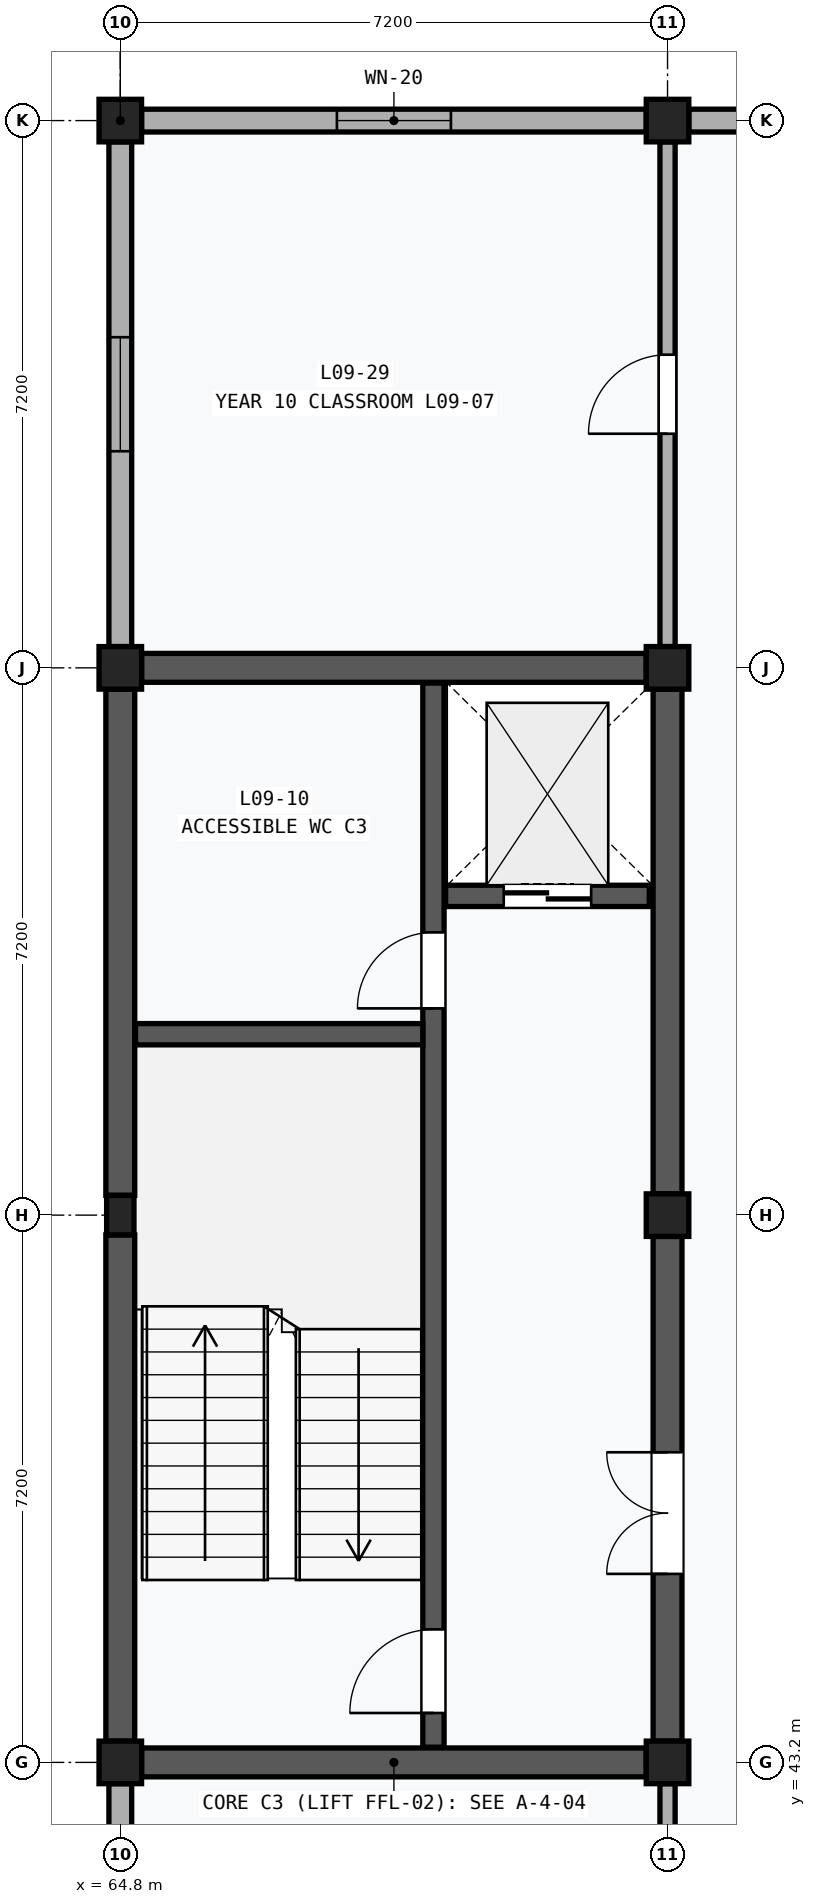
"""IFC4 building model, lengths in metres.
Left out: names, types, materials, properties, quantities, classifications, styles, units other than length and angle.
Written with IfcOpenShell. Run it as: python <this file> out.ifc"""

import sys

from ifc_helpers import new_model, si_unit, direction, frame, frame_2d, origin, origin_2d, place, context, subcontext, project, spatial, rectangle, extrude, element, fill, save


model = new_model("IFC4")
c1 = context("Model", 3, precision=1e-05, world=origin(), true_north=direction((0.0, 1.0)))
c2 = subcontext(c1, "Body", "Model", "MODEL_VIEW")
j1 = project(units=[si_unit("LENGTHUNIT", "METRE"), si_unit("PLANEANGLEUNIT", "RADIAN")], contexts=[c1])
p1 = place(None, origin())
s1 = spatial("IfcSite", under=j1, at=p1, CompositionType="ELEMENT")
p2 = place(p1, origin())
s2 = spatial("IfcBuilding", under=s1, at=p2, CompositionType="ELEMENT")
p3 = place(p2, frame((0.0, 0.0, 38.8)))
s3 = spatial("IfcBuildingStorey", under=s2, at=p3, CompositionType="ELEMENT", Elevation=38.8)
p4 = place(p3, frame((64.8, 43.2, 0.0), z_axis=(0.0, 0.0, 1.0), x_axis=(1.0, 0.0, 0.0)))
e1 = element("IfcColumn", 1, at=p4, inside=s3, PredefinedType="COLUMN", context=c2, shape_type="SweptSolid", body=[
    extrude(rectangle(XDim=0.56, YDim=0.56, at=origin_2d()), origin(), (0.0, 0.0, 1.0), 4.0),
])
p5 = place(p3, frame((64.8, 50.4, 0.0), z_axis=(0.0, 0.0, 1.0), x_axis=(1.0, 0.0, 0.0)))
e2 = element("IfcColumn", 2, at=p5, inside=s3, PredefinedType="PILASTER", context=c2, shape_type="SweptSolid", body=[
    extrude(rectangle(XDim=0.36, YDim=0.52, at=origin_2d()), origin(), (0.0, 0.0, 1.0), 4.0),
])
for number, where, z_axis, x_axis in (
    (3, (64.8, 57.6, 0.0), (0.0, 0.0, 1.0), (1.0, 0.0, 0.0)),
    (4, (64.8, 64.8, 0.0), (0.0, 0.0, 1.0), (1.0, 0.0, 0.0)),
    (5, (72.0, 43.2, 0.0), (0.0, 0.0, 1.0), (1.0, 0.0, 0.0)),
    (6, (72.0, 50.4, 0.0), (0.0, 0.0, 1.0), (1.0, 0.0, 0.0)),
    (7, (72.0, 57.6, 0.0), (0.0, 0.0, 1.0), (1.0, 0.0, 0.0)),
    (8, (72.0, 64.8, 0.0), (0.0, 0.0, 1.0), (1.0, 0.0, 0.0)),
):
    element("IfcColumn", number, at=place(p3, frame(where, z_axis=z_axis, x_axis=x_axis)), inside=s3, PredefinedType="COLUMN", context=c2, shape_type="SweptSolid", body=[
        extrude(rectangle(XDim=0.56, YDim=0.56, at=origin_2d()), origin(), (0.0, 0.0, 1.0), 4.0),
    ])
p6 = place(p3, frame((64.8, 36.28, 0.0), z_axis=(0.0, 0.0, 1.0), x_axis=(0.0, 1.0, 0.0)))
e9 = element("IfcWall", 9, at=p6, inside=s3, PredefinedType="SOLIDWALL", context=c2, shape_type="SweptSolid", body=[
    extrude(rectangle(XDim=6.64, YDim=0.3, at=frame_2d((3.32, 0.0))), origin(), (0.0, 0.0, 1.0), 3.17),
])
p7 = place(p3, frame((65.08, 64.8, 0.0), z_axis=(0.0, 0.0, 1.0), x_axis=(1.0, 0.0, 0.0)))
e10 = element("IfcWall", 10, at=p7, inside=s3, PredefinedType="SOLIDWALL", context=c2, shape_type="SweptSolid", body=[
    extrude(rectangle(XDim=6.64, YDim=0.3, at=frame_2d((3.32, 0.0))), origin(), (0.0, 0.0, 1.0), 3.17),
])
p8 = place(p7, frame((2.57, 0.0, 1.1)))
e11 = element("IfcOpeningElement", 11, at=p8, cuts=e10, PredefinedType="OPENING", context=c2, shape_type="SweptSolid", body=[
    extrude(rectangle(XDim=1.5, YDim=1.35, at=frame_2d((0.75, 0.675))), frame((0.0, 0.162, 0.0), z_axis=(0.0, -1.0, 0.0), x_axis=(1.0, 0.0, 0.0)), (0.0, 0.0, 1.0), 0.324),
])
p9 = place(p3, frame((64.8, 57.88, 0.0), z_axis=(0.0, 0.0, 1.0), x_axis=(0.0, 1.0, 0.0)))
e12 = element("IfcWall", 12, at=p9, inside=s3, PredefinedType="SOLIDWALL", context=c2, shape_type="SweptSolid", body=[
    extrude(rectangle(XDim=6.64, YDim=0.3, at=frame_2d((3.32, 0.0))), origin(), (0.0, 0.0, 1.0), 3.17),
])
p10 = place(p9, frame((2.57, 0.0, 1.1)))
e13 = element("IfcOpeningElement", 13, at=p10, cuts=e12, PredefinedType="OPENING", context=c2, shape_type="SweptSolid", body=[
    extrude(rectangle(XDim=1.5, YDim=1.35, at=frame_2d((0.75, 0.675))), frame((0.0, 0.162, 0.0), z_axis=(0.0, -1.0, 0.0), x_axis=(1.0, 0.0, 0.0)), (0.0, 0.0, 1.0), 0.324),
])
p11 = place(p3, frame((72.28, 64.8, 0.0), z_axis=(0.0, 0.0, 1.0), x_axis=(1.0, 0.0, 0.0)))
e14 = element("IfcWall", 14, at=p11, inside=s3, PredefinedType="SOLIDWALL", context=c2, shape_type="SweptSolid", body=[
    extrude(rectangle(XDim=6.74, YDim=0.3, at=frame_2d((3.37, 0.0))), origin(), (0.0, 0.0, 1.0), 3.17),
])
p12 = place(p11, frame((2.62, 0.0, 1.1)))
e15 = element("IfcOpeningElement", 15, at=p12, cuts=e14, PredefinedType="OPENING", context=c2, shape_type="SweptSolid", body=[
    extrude(rectangle(XDim=1.5, YDim=1.35, at=frame_2d((0.75, 0.675))), frame((0.0, 0.162, 0.0), z_axis=(0.0, -1.0, 0.0), x_axis=(1.0, 0.0, 0.0)), (0.0, 0.0, 1.0), 0.324),
])
p13 = place(p3, frame((64.8, 43.48, 0.0), z_axis=(0.0, 0.0, 1.0), x_axis=(0.0, 1.0, 0.0)))
e16 = element("IfcWall", 16, at=p13, inside=s3, PredefinedType="SHEAR", context=c2, shape_type="SweptSolid", body=[
    extrude(rectangle(XDim=6.66, YDim=0.38, at=frame_2d((3.33, 0.0))), origin(), (0.0, 0.0, 1.0), 3.17),
])
p14 = place(p3, frame((64.8, 50.66, 0.0), z_axis=(0.0, 0.0, 1.0), x_axis=(0.0, 1.0, 0.0)))
e17 = element("IfcWall", 17, at=p14, inside=s3, PredefinedType="SHEAR", context=c2, shape_type="SweptSolid", body=[
    extrude(rectangle(XDim=6.66, YDim=0.38, at=frame_2d((3.33, 0.0))), origin(), (0.0, 0.0, 1.0), 3.17),
])
p15 = place(p3, frame((72.0, 43.48, 0.0), z_axis=(0.0, 0.0, 1.0), x_axis=(0.0, 1.0, 0.0)))
e18 = element("IfcWall", 18, at=p15, inside=s3, PredefinedType="SHEAR", context=c2, shape_type="SweptSolid", body=[
    extrude(rectangle(XDim=6.64, YDim=0.38, at=frame_2d((3.32, 0.0))), origin(), (0.0, 0.0, 1.0), 3.01),
])
p16 = place(p15, frame((2.2, 0.0, 0.0)))
e19 = element("IfcOpeningElement", 19, at=p16, cuts=e18, PredefinedType="OPENING", context=c2, shape_type="SweptSolid", body=[
    extrude(rectangle(XDim=1.6, YDim=2.2, at=frame_2d((0.8, 1.1))), frame((0.0, 0.202, 0.0), z_axis=(0.0, -1.0, 0.0), x_axis=(1.0, 0.0, 0.0)), (0.0, 0.0, 1.0), 0.404),
])
p17 = place(p3, frame((72.0, 50.68, 0.0), z_axis=(0.0, 0.0, 1.0), x_axis=(0.0, 1.0, 0.0)))
e20 = element("IfcWall", 20, at=p17, inside=s3, PredefinedType="SHEAR", context=c2, shape_type="SweptSolid", body=[
    extrude(rectangle(XDim=6.64, YDim=0.38, at=frame_2d((3.32, 0.0))), origin(), (0.0, 0.0, 1.0), 3.01),
])
for number, where, z_axis, x_axis in (
    (21, (65.08, 43.2, 0.0), (0.0, 0.0, 1.0), (1.0, 0.0, 0.0)),
    (22, (65.08, 57.6, 0.0), (0.0, 0.0, 1.0), (1.0, 0.0, 0.0)),
):
    element("IfcWall", number, at=place(p3, frame(where, z_axis=z_axis, x_axis=x_axis)), inside=s3, PredefinedType="SHEAR", context=c2, shape_type="SweptSolid", body=[
        extrude(rectangle(XDim=6.64, YDim=0.38, at=frame_2d((3.32, 0.0))), origin(), (0.0, 0.0, 1.0), 3.01),
    ])
p18 = place(p3, frame((68.92, 43.4, 0.0), z_axis=(0.0, 0.0, 1.0), x_axis=(0.0, 1.0, 0.0)))
e23 = element("IfcWall", 23, at=p18, inside=s3, PredefinedType="SHEAR", context=c2, shape_type="SweptSolid", body=[
    extrude(rectangle(XDim=14.0, YDim=0.28, at=frame_2d((7.0, 0.0))), origin(), (0.0, 0.0, 1.0), 3.74),
])
p19 = place(p18, frame((0.45, 0.0, 0.0)))
e24 = element("IfcOpeningElement", 24, at=p19, cuts=e23, PredefinedType="OPENING", context=c2, shape_type="SweptSolid", body=[
    extrude(rectangle(XDim=1.1, YDim=2.15, at=frame_2d((0.55, 1.075))), frame((0.0, 0.152, 0.0), z_axis=(0.0, -1.0, 0.0), x_axis=(1.0, 0.0, 0.0)), (0.0, 0.0, 1.0), 0.304),
])
p20 = place(p18, frame((9.72, 0.0, 0.0)))
e25 = element("IfcOpeningElement", 25, at=p20, cuts=e23, PredefinedType="OPENING", context=c2, shape_type="SweptSolid", body=[
    extrude(rectangle(XDim=1.0, YDim=2.15, at=frame_2d((0.5, 1.075))), frame((0.0, 0.152, 0.0), z_axis=(0.0, -1.0, 0.0), x_axis=(1.0, 0.0, 0.0)), (0.0, 0.0, 1.0), 0.304),
])
p21 = place(p3, frame((65.0, 52.78, 0.0), z_axis=(0.0, 0.0, 1.0), x_axis=(1.0, 0.0, 0.0)))
e26 = element("IfcWall", 26, at=p21, inside=s3, PredefinedType="SHEAR", context=c2, shape_type="SweptSolid", body=[
    extrude(rectangle(XDim=3.78, YDim=0.28, at=frame_2d((1.89, 0.0))), origin(), (0.0, 0.0, 1.0), 3.74),
])
p22 = place(p3, frame((69.08, 54.6, 0.0), z_axis=(0.0, 0.0, 1.0), x_axis=(1.0, 0.0, 0.0)))
e27 = element("IfcWall", 27, at=p22, inside=s3, PredefinedType="SHEAR", context=c2, shape_type="SweptSolid", body=[
    extrude(rectangle(XDim=2.68, YDim=0.28, at=frame_2d((1.34, 0.0))), origin(), (0.0, 0.0, 1.0), 3.74),
])
p23 = place(p22, frame((0.765, 0.0, 0.0)))
e28 = element("IfcOpeningElement", 28, at=p23, cuts=e27, PredefinedType="OPENING", context=c2, shape_type="SweptSolid", body=[
    extrude(rectangle(XDim=1.15, YDim=2.2, at=frame_2d((0.575, 1.1))), frame((0.0, 0.152, 0.0), z_axis=(0.0, -1.0, 0.0), x_axis=(1.0, 0.0, 0.0)), (0.0, 0.0, 1.0), 0.304),
])
p24 = place(p3, frame((72.0, 36.28, 0.0), z_axis=(0.0, 0.0, 1.0), x_axis=(0.0, 1.0, 0.0)))
e29 = element("IfcWall", 29, at=p24, inside=s3, PredefinedType="PARTITIONING", context=c2, shape_type="SweptSolid", body=[
    extrude(rectangle(XDim=6.64, YDim=0.2, at=frame_2d((3.32, 0.0))), origin(), (0.0, 0.0, 1.0), 3.01),
])
p25 = place(p24, frame((2.81, 0.0, 0.0)))
e30 = element("IfcOpeningElement", 30, at=p25, cuts=e29, PredefinedType="OPENING", context=c2, shape_type="SweptSolid", body=[
    extrude(rectangle(XDim=1.02, YDim=2.12, at=frame_2d((0.51, 1.06))), frame((0.0, 0.112, 0.0), z_axis=(0.0, -1.0, 0.0), x_axis=(1.0, 0.0, 0.0)), (0.0, 0.0, 1.0), 0.224),
])
p26 = place(p3, frame((72.0, 57.88, 0.0), z_axis=(0.0, 0.0, 1.0), x_axis=(0.0, 1.0, 0.0)))
e31 = element("IfcWall", 31, at=p26, inside=s3, PredefinedType="PARTITIONING", context=c2, shape_type="SweptSolid", body=[
    extrude(rectangle(XDim=6.64, YDim=0.2, at=frame_2d((3.32, 0.0))), origin(), (0.0, 0.0, 1.0), 3.01),
])
p27 = place(p26, frame((2.8, 0.0, 0.0)))
e32 = element("IfcOpeningElement", 32, at=p27, cuts=e31, PredefinedType="OPENING", context=c2, shape_type="SweptSolid", body=[
    extrude(rectangle(XDim=1.04, YDim=2.14, at=frame_2d((0.52, 1.07))), frame((0.0, 0.112, 0.0), z_axis=(0.0, -1.0, 0.0), x_axis=(1.0, 0.0, 0.0)), (0.0, 0.0, 1.0), 0.224),
])
p28 = place(p8, origin())
e33 = element("IfcWindow", 33, at=p28, inside=s3, PartitioningType="SINGLE_PANEL", PredefinedType="WINDOW", context=c2, shape_type="SweptSolid", body=[
    extrude(rectangle(XDim=1.5, YDim=1.35, at=frame_2d((0.75, 0.675))), frame((0.0, 0.03, 0.0), z_axis=(0.0, -1.0, 0.0), x_axis=(1.0, 0.0, 0.0)), (0.0, 0.0, 1.0), 0.06),
])
fill(e11, e33)
p29 = place(p10, origin())
e34 = element("IfcWindow", 34, at=p29, inside=s3, PartitioningType="SINGLE_PANEL", PredefinedType="WINDOW", context=c2, shape_type="SweptSolid", body=[
    extrude(rectangle(XDim=1.5, YDim=1.35, at=frame_2d((0.75, 0.675))), frame((0.0, 0.03, 0.0), z_axis=(0.0, -1.0, 0.0), x_axis=(1.0, 0.0, 0.0)), (0.0, 0.0, 1.0), 0.06),
])
fill(e13, e34)
p30 = place(p16, origin())
e35 = element("IfcDoor", 35, at=p30, inside=s3, OperationType="DOUBLE_DOOR_SINGLE_SWING", PredefinedType="DOOR", context=c2, shape_type="SweptSolid", body=[
    extrude(rectangle(XDim=1.6, YDim=2.2, at=frame_2d((0.8, 1.1))), frame((0.0, 0.025, 0.0), z_axis=(0.0, -1.0, 0.0), x_axis=(1.0, 0.0, 0.0)), (0.0, 0.0, 1.0), 0.05),
])
fill(e19, e35)
p31 = place(p19, origin())
e36 = element("IfcDoor", 36, at=p31, inside=s3, OperationType="SINGLE_SWING_LEFT", PredefinedType="DOOR", context=c2, shape_type="SweptSolid", body=[
    extrude(rectangle(XDim=1.1, YDim=2.15, at=frame_2d((0.55, 1.075))), frame((0.0, 0.025, 0.0), z_axis=(0.0, -1.0, 0.0), x_axis=(1.0, 0.0, 0.0)), (0.0, 0.0, 1.0), 0.05),
])
fill(e24, e36)
p32 = place(p20, origin())
e37 = element("IfcDoor", 37, at=p32, inside=s3, OperationType="SINGLE_SWING_LEFT", PredefinedType="DOOR", context=c2, shape_type="SweptSolid", body=[
    extrude(rectangle(XDim=1.0, YDim=2.15, at=frame_2d((0.5, 1.075))), frame((0.0, 0.025, 0.0), z_axis=(0.0, -1.0, 0.0), x_axis=(1.0, 0.0, 0.0)), (0.0, 0.0, 1.0), 0.05),
])
fill(e25, e37)
p33 = place(p23, frame((1.15, 0.0, 0.0), z_axis=(0.0, 0.0, 1.0), x_axis=(-1.0, 0.0, 0.0)))
e38 = element("IfcDoor", 38, at=p33, inside=s3, OperationType="DOUBLE_DOOR_SLIDING", PredefinedType="DOOR", context=c2, shape_type="SweptSolid", body=[
    extrude(rectangle(XDim=1.15, YDim=2.2, at=frame_2d((0.575, 1.1))), frame((0.0, 0.025, 0.0), z_axis=(0.0, -1.0, 0.0), x_axis=(1.0, 0.0, 0.0)), (0.0, 0.0, 1.0), 0.05),
])
fill(e28, e38)
p34 = place(p27, origin())
e39 = element("IfcDoor", 39, at=p34, inside=s3, OperationType="SINGLE_SWING_LEFT", PredefinedType="DOOR", context=c2, shape_type="SweptSolid", body=[
    extrude(rectangle(XDim=1.04, YDim=2.14, at=frame_2d((0.52, 1.07))), frame((0.0, 0.025, 0.0), z_axis=(0.0, -1.0, 0.0), x_axis=(1.0, 0.0, 0.0)), (0.0, 0.0, 1.0), 0.05),
])
fill(e32, e39)
save(model, sys.argv[1])
